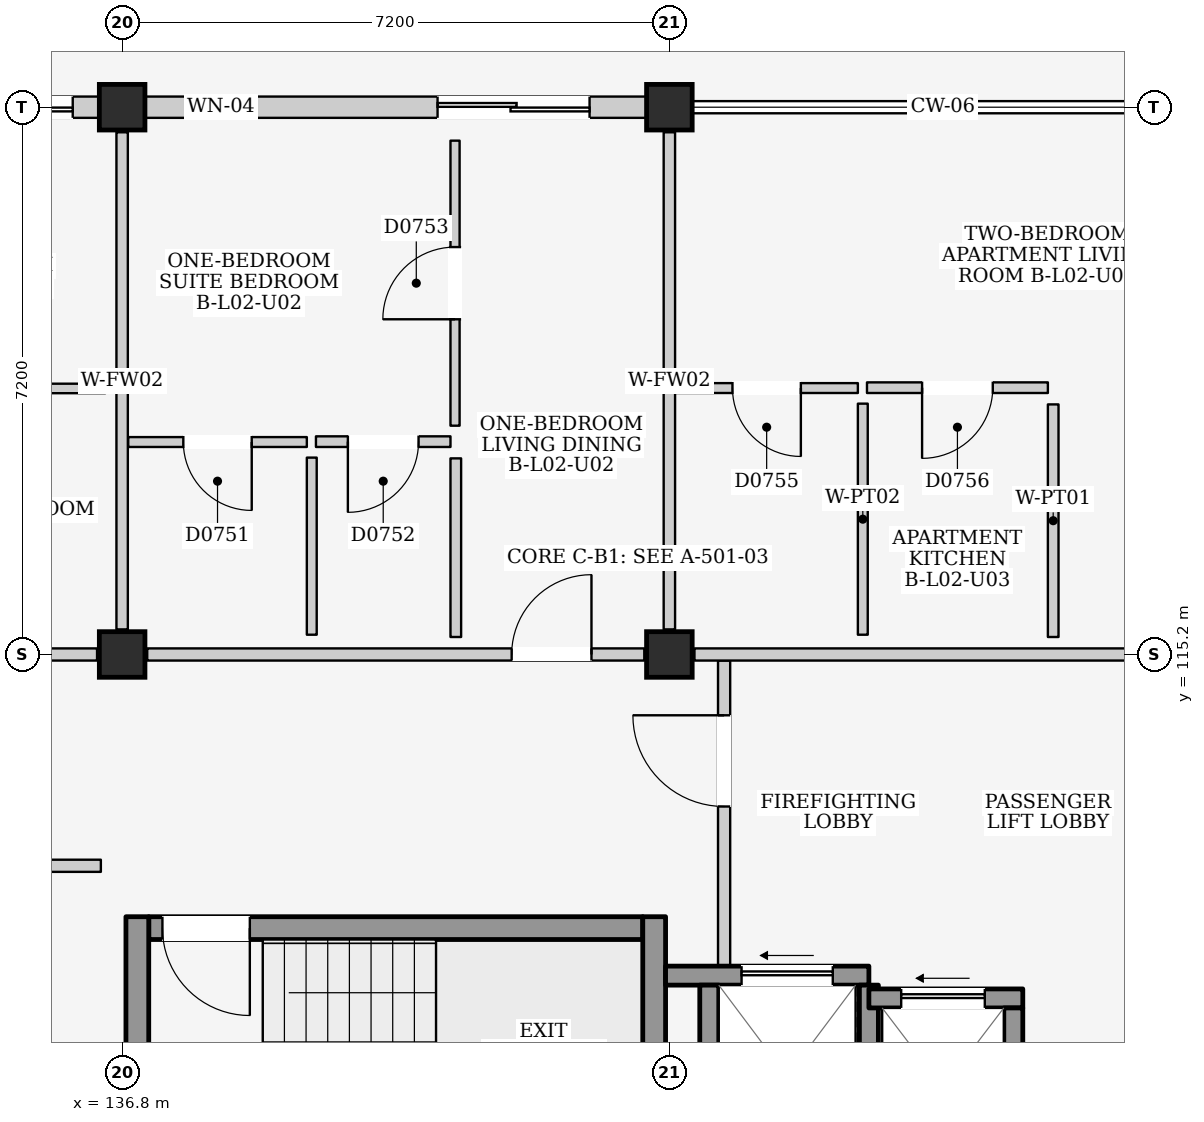
"""IFC4 building model, lengths in metres.
Left out: names, types, materials, properties, quantities, classifications, styles, units other than length and angle.
Written with IfcOpenShell. Run it as: python <this file> out.ifc"""

import sys

from ifc_helpers import new_model, si_unit, direction, frame, frame_2d, origin, origin_2d, place, context, subcontext, project, spatial, rectangle, extrude, element, fill, save


model = new_model("IFC4")
c1 = context("Model", 3, precision=1e-05, world=origin(), true_north=direction((0.0, 1.0)))
c2 = subcontext(c1, "Body", "Model", "MODEL_VIEW")
j1 = project(units=[si_unit("LENGTHUNIT", "METRE"), si_unit("PLANEANGLEUNIT", "RADIAN")], contexts=[c1])
p1 = place(None, origin())
s1 = spatial("IfcSite", under=j1, at=p1, CompositionType="ELEMENT")
p2 = place(p1, origin())
s2 = spatial("IfcBuilding", under=s1, at=p2, CompositionType="ELEMENT")
p3 = place(p2, frame((0.0, 0.0, 9.0)))
s3 = spatial("IfcBuildingStorey", under=s2, at=p3, CompositionType="ELEMENT", Elevation=9.0)
for number, where, z_axis, x_axis in (
    (1, (136.8, 115.2, 0.0), (0.0, 0.0, 1.0), (1.0, 0.0, 0.0)),
    (2, (136.8, 122.4, 0.0), (0.0, 0.0, 1.0), (1.0, 0.0, 0.0)),
    (3, (144.0, 115.2, 0.0), (0.0, 0.0, 1.0), (1.0, 0.0, 0.0)),
    (4, (144.0, 122.4, 0.0), (0.0, 0.0, 1.0), (1.0, 0.0, 0.0)),
):
    element("IfcColumn", number, at=place(p3, frame(where, z_axis=z_axis, x_axis=x_axis)), inside=s3, PredefinedType="COLUMN", context=c2, shape_type="SweptSolid", body=[
        extrude(rectangle(XDim=0.6, YDim=0.6, at=origin_2d()), origin(), (0.0, 0.0, 1.0), 3.2),
    ])
p4 = place(p3, frame((129.9, 122.4, 0.0), z_axis=(0.0, 0.0, 1.0), x_axis=(1.0, 0.0, 0.0)))
e5 = element("IfcWall", 5, at=p4, inside=s3, PredefinedType="ELEMENTEDWALL", context=c2, shape_type="SweptSolid", body=[
    extrude(rectangle(XDim=6.6, YDim=0.28, at=frame_2d((3.3, 0.0))), origin(), (0.0, 0.0, 1.0), 2.425),
])
p5 = place(p4, frame((3.85, 0.0, 0.0)))
e6 = element("IfcOpeningElement", 6, at=p5, cuts=e5, PredefinedType="OPENING", context=c2, shape_type="SweptSolid", body=[
    extrude(rectangle(XDim=2.4, YDim=2.12, at=frame_2d((1.2, 1.06))), frame((0.0, 0.155, 0.0), z_axis=(0.0, -1.0, 0.0), x_axis=(1.0, 0.0, 0.0)), (0.0, 0.0, 1.0), 0.31),
])
p6 = place(p4, frame((0.55, 0.0, 0.9)))
e7 = element("IfcOpeningElement", 7, at=p6, cuts=e5, PredefinedType="OPENING", context=c2, shape_type="SweptSolid", body=[
    extrude(rectangle(XDim=1.2, YDim=1.35, at=frame_2d((0.6, 0.675))), frame((0.0, 0.155, 0.0), z_axis=(0.0, -1.0, 0.0), x_axis=(1.0, 0.0, 0.0)), (0.0, 0.0, 1.0), 0.31),
])
p7 = place(p3, frame((137.1, 122.4, 0.0), z_axis=(0.0, 0.0, 1.0), x_axis=(1.0, 0.0, 0.0)))
e8 = element("IfcWall", 8, at=p7, inside=s3, PredefinedType="ELEMENTEDWALL", context=c2, shape_type="SweptSolid", body=[
    extrude(rectangle(XDim=6.6, YDim=0.28, at=frame_2d((3.3, 0.0))), origin(), (0.0, 0.0, 1.0), 2.425),
])
p8 = place(p7, frame((3.85, 0.0, 0.0)))
e9 = element("IfcOpeningElement", 9, at=p8, cuts=e8, PredefinedType="OPENING", context=c2, shape_type="SweptSolid", body=[
    extrude(rectangle(XDim=2.0, YDim=2.12, at=frame_2d((1.0, 1.06))), frame((0.0, 0.155, 0.0), z_axis=(0.0, -1.0, 0.0), x_axis=(1.0, 0.0, 0.0)), (0.0, 0.0, 1.0), 0.31),
])
p9 = place(p7, frame((0.55, 0.0, 0.9)))
e10 = element("IfcOpeningElement", 10, at=p9, cuts=e8, PredefinedType="OPENING", context=c2, shape_type="SweptSolid", body=[
    extrude(rectangle(XDim=0.9, YDim=1.1, at=frame_2d((0.45, 0.55))), frame((0.0, 0.155, 0.0), z_axis=(0.0, -1.0, 0.0), x_axis=(1.0, 0.0, 0.0)), (0.0, 0.0, 1.0), 0.31),
])
p10 = place(p3, frame((137.15, 111.6, 0.0), z_axis=(0.0, 0.0, 1.0), x_axis=(1.0, 0.0, 0.0)))
e11 = element("IfcWall", 11, at=p10, inside=s3, PredefinedType="SHEAR", context=c2, shape_type="SweptSolid", body=[
    extrude(rectangle(XDim=6.5, YDim=0.3, at=frame_2d((3.25, 0.0))), origin(), (0.0, 0.0, 1.0), 2.96),
])
p11 = place(p10, frame((0.18, 0.0, 0.0)))
e12 = element("IfcOpeningElement", 12, at=p11, cuts=e11, PredefinedType="OPENING", context=c2, shape_type="SweptSolid", body=[
    extrude(rectangle(XDim=1.15, YDim=2.2, at=frame_2d((0.575, 1.1))), frame((0.0, 0.165, 0.0), z_axis=(0.0, -1.0, 0.0), x_axis=(1.0, 0.0, 0.0)), (0.0, 0.0, 1.0), 0.33),
])
for number, where, z_axis, x_axis in (
    (13, (137.0, 108.15, 0.0), (0.0, 0.0, 1.0), (0.0, 1.0, 0.0)),
    (14, (143.8, 108.15, 0.0), (0.0, 0.0, 1.0), (0.0, 1.0, 0.0)),
):
    element("IfcWall", number, at=place(p3, frame(where, z_axis=z_axis, x_axis=x_axis)), inside=s3, PredefinedType="SHEAR", context=c2, shape_type="SweptSolid", body=[
        extrude(rectangle(XDim=3.6, YDim=0.3, at=frame_2d((1.8, 0.0))), origin(), (0.0, 0.0, 1.0), 2.96),
    ])
p12 = place(p3, frame((144.72, 111.1, 0.0), z_axis=(0.0, 0.0, 1.0), x_axis=(0.0, 1.0, 0.0)))
e15 = element("IfcWall", 15, at=p12, inside=s3, PredefinedType="PARTITIONING", context=c2, shape_type="SweptSolid", body=[
    extrude(rectangle(XDim=4.02, YDim=0.16, at=frame_2d((2.01, 0.0))), origin(), (0.0, 0.0, 1.0), 2.96),
])
p13 = place(p12, frame((2.1, 0.0, 0.0)))
e16 = element("IfcOpeningElement", 16, at=p13, cuts=e15, PredefinedType="OPENING", context=c2, shape_type="SweptSolid", body=[
    extrude(rectangle(XDim=1.2, YDim=2.2, at=frame_2d((0.6, 1.1))), frame((0.0, 0.095, 0.0), z_axis=(0.0, -1.0, 0.0), x_axis=(1.0, 0.0, 0.0)), (0.0, 0.0, 1.0), 0.19),
])
p14 = place(p3, frame((143.95, 110.975, 0.0), z_axis=(0.0, 0.0, 1.0), x_axis=(1.0, 0.0, 0.0)))
e17 = element("IfcWall", 17, at=p14, inside=s3, PredefinedType="SHEAR", context=c2, shape_type="SweptSolid", body=[
    extrude(rectangle(XDim=2.675, YDim=0.25, at=frame_2d((1.337, 0.0))), origin(), (0.0, 0.0, 1.0), 2.96),
])
p15 = place(p14, frame((1.0, 0.0, 0.0)))
e18 = element("IfcOpeningElement", 18, at=p15, cuts=e17, PredefinedType="OPENING", context=c2, shape_type="SweptSolid", body=[
    extrude(rectangle(XDim=1.2, YDim=2.25, at=frame_2d((0.6, 1.125))), frame((0.0, 0.14, 0.0), z_axis=(0.0, -1.0, 0.0), x_axis=(1.0, 0.0, 0.0)), (0.0, 0.0, 1.0), 0.28),
])
for number, where, z_axis, x_axis in (
    (19, (144.525, 108.45, 0.0), (0.0, 0.0, 1.0), (0.0, 1.0, 0.0)),
    (20, (146.625, 108.45, 0.0), (0.0, 0.0, 1.0), (0.0, 1.0, 0.0)),
):
    element("IfcWall", number, at=place(p3, frame(where, z_axis=z_axis, x_axis=x_axis)), inside=s3, PredefinedType="SHEAR", context=c2, shape_type="SweptSolid", body=[
        extrude(rectangle(XDim=2.4, YDim=0.25, at=frame_2d((1.2, 0.0))), origin(), (0.0, 0.0, 1.0), 2.96),
    ])
p16 = place(p3, frame((146.625, 110.675, 0.0), z_axis=(0.0, 0.0, 1.0), x_axis=(1.0, 0.0, 0.0)))
e21 = element("IfcWall", 21, at=p16, inside=s3, PredefinedType="SHEAR", context=c2, shape_type="SweptSolid", body=[
    extrude(rectangle(XDim=2.025, YDim=0.25, at=frame_2d((1.012, 0.0))), origin(), (0.0, 0.0, 1.0), 2.96),
])
p17 = place(p16, frame((0.425, 0.0, 0.0)))
e22 = element("IfcOpeningElement", 22, at=p17, cuts=e21, PredefinedType="OPENING", context=c2, shape_type="SweptSolid", body=[
    extrude(rectangle(XDim=1.1, YDim=2.15, at=frame_2d((0.55, 1.075))), frame((0.0, 0.14, 0.0), z_axis=(0.0, -1.0, 0.0), x_axis=(1.0, 0.0, 0.0)), (0.0, 0.0, 1.0), 0.28),
])
p18 = place(p3, frame((148.525, 108.45, 0.0), z_axis=(0.0, 0.0, 1.0), x_axis=(0.0, 1.0, 0.0)))
e23 = element("IfcWall", 23, at=p18, inside=s3, PredefinedType="SHEAR", context=c2, shape_type="SweptSolid", body=[
    extrude(rectangle(XDim=2.1, YDim=0.25, at=frame_2d((1.05, 0.0))), origin(), (0.0, 0.0, 1.0), 2.96),
])
p19 = place(p3, frame((129.93, 115.2, 0.0), z_axis=(0.0, 0.0, 1.0), x_axis=(1.0, 0.0, 0.0)))
e24 = element("IfcWall", 24, at=p19, inside=s3, PredefinedType="PARTITIONING", context=c2, shape_type="SweptSolid", body=[
    extrude(rectangle(XDim=6.54, YDim=0.16, at=frame_2d((3.27, 0.0))), origin(), (0.0, 0.0, 1.0), 2.345),
])
p20 = place(p3, frame((136.8, 115.53, 0.0), z_axis=(0.0, 0.0, 1.0), x_axis=(0.0, 1.0, 0.0)))
e25 = element("IfcWall", 25, at=p20, inside=s3, PredefinedType="PARTITIONING", context=c2, shape_type="SweptSolid", body=[
    extrude(rectangle(XDim=6.54, YDim=0.15, at=frame_2d((3.27, 0.0))), origin(), (0.0, 0.0, 1.0), 2.395),
])
p21 = place(p3, frame((132.52, 118.7, 0.0), z_axis=(0.0, 0.0, 1.0), x_axis=(1.0, 0.0, 0.0)))
e26 = element("IfcWall", 26, at=p21, inside=s3, PredefinedType="PARTITIONING", context=c2, shape_type="SweptSolid", body=[
    extrude(rectangle(XDim=4.06, YDim=0.125, at=frame_2d((2.03, 0.0))), origin(), (0.0, 0.0, 1.0), 2.96),
])
p22 = place(p3, frame((137.13, 115.2, 0.0), z_axis=(0.0, 0.0, 1.0), x_axis=(1.0, 0.0, 0.0)))
e27 = element("IfcWall", 27, at=p22, inside=s3, PredefinedType="PARTITIONING", context=c2, shape_type="SweptSolid", body=[
    extrude(rectangle(XDim=6.54, YDim=0.16, at=frame_2d((3.27, 0.0))), origin(), (0.0, 0.0, 1.0), 2.345),
])
p23 = place(p22, frame((4.795, 0.0, 0.0)))
e28 = element("IfcOpeningElement", 28, at=p23, cuts=e27, PredefinedType="OPENING", context=c2, shape_type="SweptSolid", body=[
    extrude(rectangle(XDim=1.05, YDim=2.15, at=frame_2d((0.525, 1.075))), frame((0.0, 0.095, 0.0), z_axis=(0.0, -1.0, 0.0), x_axis=(1.0, 0.0, 0.0)), (0.0, 0.0, 1.0), 0.19),
])
p24 = place(p3, frame((144.0, 115.53, 0.0), z_axis=(0.0, 0.0, 1.0), x_axis=(0.0, 1.0, 0.0)))
e29 = element("IfcWall", 29, at=p24, inside=s3, PredefinedType="PARTITIONING", context=c2, shape_type="SweptSolid", body=[
    extrude(rectangle(XDim=6.54, YDim=0.15, at=frame_2d((3.27, 0.0))), origin(), (0.0, 0.0, 1.0), 2.395),
])
p25 = place(p3, frame((136.88, 117.995, 0.0), z_axis=(0.0, 0.0, 1.0), x_axis=(1.0, 0.0, 0.0)))
e30 = element("IfcWall", 30, at=p25, inside=s3, PredefinedType="PARTITIONING", context=c2, shape_type="SweptSolid", body=[
    extrude(rectangle(XDim=2.35, YDim=0.13, at=frame_2d((1.175, 0.0))), origin(), (0.0, 0.0, 1.0), 2.96),
])
p26 = place(p25, frame((0.725, 0.0, 0.0)))
e31 = element("IfcOpeningElement", 31, at=p26, cuts=e30, PredefinedType="OPENING", context=c2, shape_type="SweptSolid", body=[
    extrude(rectangle(XDim=0.9, YDim=2.1, at=frame_2d((0.45, 1.05))), frame((0.0, 0.08, 0.0), z_axis=(0.0, -1.0, 0.0), x_axis=(1.0, 0.0, 0.0)), (0.0, 0.0, 1.0), 0.16),
])
p27 = place(p3, frame((139.295, 115.46, 0.0), z_axis=(0.0, 0.0, 1.0), x_axis=(0.0, 1.0, 0.0)))
e32 = element("IfcWall", 32, at=p27, inside=s3, PredefinedType="PARTITIONING", context=c2, shape_type="SweptSolid", body=[
    extrude(rectangle(XDim=2.33, YDim=0.13, at=frame_2d((1.165, 0.0))), origin(), (0.0, 0.0, 1.0), 2.96),
])
p28 = place(p3, frame((139.35, 118.0, 0.0), z_axis=(0.0, 0.0, 1.0), x_axis=(1.0, 0.0, 0.0)))
e33 = element("IfcWall", 33, at=p28, inside=s3, PredefinedType="PARTITIONING", context=c2, shape_type="SweptSolid", body=[
    extrude(rectangle(XDim=1.77, YDim=0.14, at=frame_2d((0.885, 0.0))), origin(), (0.0, 0.0, 1.0), 2.96),
])
p29 = place(p28, frame((0.42, 0.0, 0.0)))
e34 = element("IfcOpeningElement", 34, at=p29, cuts=e33, PredefinedType="OPENING", context=c2, shape_type="SweptSolid", body=[
    extrude(rectangle(XDim=0.93, YDim=2.14, at=frame_2d((0.465, 1.07))), frame((0.0, 0.085, 0.0), z_axis=(0.0, -1.0, 0.0), x_axis=(1.0, 0.0, 0.0)), (0.0, 0.0, 1.0), 0.17),
])
p30 = place(p3, frame((141.19, 115.43, 0.0), z_axis=(0.0, 0.0, 1.0), x_axis=(0.0, 1.0, 0.0)))
e35 = element("IfcWall", 35, at=p30, inside=s3, PredefinedType="PARTITIONING", context=c2, shape_type="SweptSolid", body=[
    extrude(rectangle(XDim=2.35, YDim=0.14, at=frame_2d((1.175, 0.0))), origin(), (0.0, 0.0, 1.0), 2.96),
])
p31 = place(p3, frame((141.18, 118.21, 0.0), z_axis=(0.0, 0.0, 1.0), x_axis=(0.0, 1.0, 0.0)))
e36 = element("IfcWall", 36, at=p31, inside=s3, PredefinedType="PARTITIONING", context=c2, shape_type="SweptSolid", body=[
    extrude(rectangle(XDim=3.75, YDim=0.12, at=frame_2d((1.875, 0.0))), origin(), (0.0, 0.0, 1.0), 2.96),
])
p32 = place(p31, frame((1.4, 0.0, 0.0)))
e37 = element("IfcOpeningElement", 37, at=p32, cuts=e36, PredefinedType="OPENING", context=c2, shape_type="SweptSolid", body=[
    extrude(rectangle(XDim=0.95, YDim=2.15, at=frame_2d((0.475, 1.075))), frame((0.0, 0.075, 0.0), z_axis=(0.0, -1.0, 0.0), x_axis=(1.0, 0.0, 0.0)), (0.0, 0.0, 1.0), 0.15),
])
p33 = place(p3, frame((144.33, 115.2, 0.0), z_axis=(0.0, 0.0, 1.0), x_axis=(1.0, 0.0, 0.0)))
e38 = element("IfcWall", 38, at=p33, inside=s3, PredefinedType="PARTITIONING", context=c2, shape_type="SweptSolid", body=[
    extrude(rectangle(XDim=6.54, YDim=0.16, at=frame_2d((3.27, 0.0))), origin(), (0.0, 0.0, 1.0), 2.345),
])
p34 = place(p3, frame((144.08, 118.705, 0.0), z_axis=(0.0, 0.0, 1.0), x_axis=(1.0, 0.0, 0.0)))
e39 = element("IfcWall", 39, at=p34, inside=s3, PredefinedType="PARTITIONING", context=c2, shape_type="SweptSolid", body=[
    extrude(rectangle(XDim=2.4, YDim=0.13, at=frame_2d((1.2, 0.0))), origin(), (0.0, 0.0, 1.0), 2.96),
])
p35 = place(p34, frame((0.75, 0.0, 0.0)))
e40 = element("IfcOpeningElement", 40, at=p35, cuts=e39, PredefinedType="OPENING", context=c2, shape_type="SweptSolid", body=[
    extrude(rectangle(XDim=0.9, YDim=2.1, at=frame_2d((0.45, 1.05))), frame((0.0, 0.08, 0.0), z_axis=(0.0, -1.0, 0.0), x_axis=(1.0, 0.0, 0.0)), (0.0, 0.0, 1.0), 0.16),
])
p36 = place(p3, frame((146.545, 115.46, 0.0), z_axis=(0.0, 0.0, 1.0), x_axis=(0.0, 1.0, 0.0)))
e41 = element("IfcWall", 41, at=p36, inside=s3, PredefinedType="PARTITIONING", context=c2, shape_type="SweptSolid", body=[
    extrude(rectangle(XDim=3.04, YDim=0.13, at=frame_2d((1.52, 0.0))), origin(), (0.0, 0.0, 1.0), 2.96),
])
p37 = place(p3, frame((146.6, 118.71, 0.0), z_axis=(0.0, 0.0, 1.0), x_axis=(1.0, 0.0, 0.0)))
e42 = element("IfcWall", 42, at=p37, inside=s3, PredefinedType="PARTITIONING", context=c2, shape_type="SweptSolid", body=[
    extrude(rectangle(XDim=2.38, YDim=0.14, at=frame_2d((1.19, 0.0))), origin(), (0.0, 0.0, 1.0), 2.96),
])
p38 = place(p37, frame((0.725, 0.0, 0.0)))
e43 = element("IfcOpeningElement", 43, at=p38, cuts=e42, PredefinedType="OPENING", context=c2, shape_type="SweptSolid", body=[
    extrude(rectangle(XDim=0.93, YDim=2.14, at=frame_2d((0.465, 1.07))), frame((0.0, 0.085, 0.0), z_axis=(0.0, -1.0, 0.0), x_axis=(1.0, 0.0, 0.0)), (0.0, 0.0, 1.0), 0.17),
])
p39 = place(p3, frame((149.05, 115.43, 0.0), z_axis=(0.0, 0.0, 1.0), x_axis=(0.0, 1.0, 0.0)))
e44 = element("IfcWall", 44, at=p39, inside=s3, PredefinedType="PARTITIONING", context=c2, shape_type="SweptSolid", body=[
    extrude(rectangle(XDim=3.06, YDim=0.14, at=frame_2d((1.53, 0.0))), origin(), (0.0, 0.0, 1.0), 2.96),
])
p40 = place(p3, frame((129.88, 112.42, 0.0), z_axis=(0.0, 0.0, 1.0), x_axis=(1.0, 0.0, 0.0)))
e45 = element("IfcWall", 45, at=p40, inside=s3, PredefinedType="PARTITIONING", context=c2, shape_type="SweptSolid", body=[
    extrude(rectangle(XDim=6.64, YDim=0.16, at=frame_2d((3.32, 0.0))), origin(), (0.0, 0.0, 1.0), 2.96),
])
p41 = place(p40, frame((2.78, 0.0, 0.0)))
e46 = element("IfcOpeningElement", 46, at=p41, cuts=e45, PredefinedType="OPENING", context=c2, shape_type="SweptSolid", body=[
    extrude(rectangle(XDim=1.08, YDim=2.22, at=frame_2d((0.54, 1.11))), frame((0.0, 0.095, 0.0), z_axis=(0.0, -1.0, 0.0), x_axis=(1.0, 0.0, 0.0)), (0.0, 0.0, 1.0), 0.19),
])
p42 = place(p5, frame((2.4, 0.0, 0.0), z_axis=(0.0, 0.0, 1.0), x_axis=(-1.0, 0.0, 0.0)))
e47 = element("IfcDoor", 47, at=p42, inside=s3, OperationType="DOUBLE_DOOR_SLIDING", PredefinedType="DOOR", context=c2, shape_type="SweptSolid", body=[
    extrude(rectangle(XDim=2.4, YDim=2.12, at=frame_2d((1.2, 1.06))), frame((0.0, 0.025, 0.0), z_axis=(0.0, -1.0, 0.0), x_axis=(1.0, 0.0, 0.0)), (0.0, 0.0, 1.0), 0.05),
])
fill(e6, e47)
p43 = place(p8, frame((2.0, 0.0, 0.0), z_axis=(0.0, 0.0, 1.0), x_axis=(-1.0, 0.0, 0.0)))
e48 = element("IfcDoor", 48, at=p43, inside=s3, OperationType="DOUBLE_DOOR_SLIDING", PredefinedType="DOOR", context=c2, shape_type="SweptSolid", body=[
    extrude(rectangle(XDim=2.0, YDim=2.12, at=frame_2d((1.0, 1.06))), frame((0.0, 0.025, 0.0), z_axis=(0.0, -1.0, 0.0), x_axis=(1.0, 0.0, 0.0)), (0.0, 0.0, 1.0), 0.05),
])
fill(e9, e48)
p44 = place(p9, origin())
e49 = element("IfcWindow", 49, at=p44, inside=s3, PartitioningType="SINGLE_PANEL", PredefinedType="WINDOW", context=c2, shape_type="SweptSolid", body=[
    extrude(rectangle(XDim=0.9, YDim=1.1, at=frame_2d((0.45, 0.55))), frame((0.0, 0.03, 0.0), z_axis=(0.0, -1.0, 0.0), x_axis=(1.0, 0.0, 0.0)), (0.0, 0.0, 1.0), 0.06),
])
fill(e10, e49)
p45 = place(p11, frame((1.15, 0.0, 0.0), z_axis=(0.0, 0.0, 1.0), x_axis=(-1.0, 0.0, 0.0)))
e50 = element("IfcDoor", 50, at=p45, inside=s3, OperationType="SINGLE_SWING_LEFT", PredefinedType="DOOR", context=c2, shape_type="SweptSolid", body=[
    extrude(rectangle(XDim=1.15, YDim=2.2, at=frame_2d((0.575, 1.1))), frame((0.0, 0.025, 0.0), z_axis=(0.0, -1.0, 0.0), x_axis=(1.0, 0.0, 0.0)), (0.0, 0.0, 1.0), 0.05),
])
fill(e12, e50)
p46 = place(p13, origin())
e51 = element("IfcDoor", 51, at=p46, inside=s3, OperationType="SINGLE_SWING_RIGHT", PredefinedType="DOOR", context=c2, shape_type="SweptSolid", body=[
    extrude(rectangle(XDim=1.2, YDim=2.2, at=frame_2d((0.6, 1.1))), frame((0.0, 0.025, 0.0), z_axis=(0.0, -1.0, 0.0), x_axis=(1.0, 0.0, 0.0)), (0.0, 0.0, 1.0), 0.05),
])
fill(e16, e51)
p47 = place(p15, origin())
e52 = element("IfcDoor", 52, at=p47, inside=s3, OperationType="SLIDING_TO_LEFT", PredefinedType="DOOR", context=c2, shape_type="SweptSolid", body=[
    extrude(rectangle(XDim=1.2, YDim=2.25, at=frame_2d((0.6, 1.125))), frame((0.0, 0.025, 0.0), z_axis=(0.0, -1.0, 0.0), x_axis=(1.0, 0.0, 0.0)), (0.0, 0.0, 1.0), 0.05),
])
fill(e18, e52)
p48 = place(p17, origin())
e53 = element("IfcDoor", 53, at=p48, inside=s3, OperationType="SLIDING_TO_LEFT", PredefinedType="DOOR", context=c2, shape_type="SweptSolid", body=[
    extrude(rectangle(XDim=1.1, YDim=2.15, at=frame_2d((0.55, 1.075))), frame((0.0, 0.025, 0.0), z_axis=(0.0, -1.0, 0.0), x_axis=(1.0, 0.0, 0.0)), (0.0, 0.0, 1.0), 0.05),
])
fill(e22, e53)
p49 = place(p23, origin())
e54 = element("IfcDoor", 54, at=p49, inside=s3, OperationType="SINGLE_SWING_RIGHT", PredefinedType="DOOR", context=c2, shape_type="SweptSolid", body=[
    extrude(rectangle(XDim=1.05, YDim=2.15, at=frame_2d((0.525, 1.075))), frame((0.0, 0.025, 0.0), z_axis=(0.0, -1.0, 0.0), x_axis=(1.0, 0.0, 0.0)), (0.0, 0.0, 1.0), 0.05),
])
fill(e28, e54)
p50 = place(p26, frame((0.9, 0.0, 0.0), z_axis=(0.0, 0.0, 1.0), x_axis=(-1.0, 0.0, 0.0)))
e55 = element("IfcDoor", 55, at=p50, inside=s3, OperationType="SINGLE_SWING_LEFT", PredefinedType="DOOR", context=c2, shape_type="SweptSolid", body=[
    extrude(rectangle(XDim=0.9, YDim=2.1, at=frame_2d((0.45, 1.05))), frame((0.0, 0.025, 0.0), z_axis=(0.0, -1.0, 0.0), x_axis=(1.0, 0.0, 0.0)), (0.0, 0.0, 1.0), 0.05),
])
fill(e31, e55)
p51 = place(p29, frame((0.93, 0.0, 0.0), z_axis=(0.0, 0.0, 1.0), x_axis=(-1.0, 0.0, 0.0)))
e56 = element("IfcDoor", 56, at=p51, inside=s3, OperationType="SINGLE_SWING_RIGHT", PredefinedType="DOOR", context=c2, shape_type="SweptSolid", body=[
    extrude(rectangle(XDim=0.93, YDim=2.14, at=frame_2d((0.465, 1.07))), frame((0.0, 0.025, 0.0), z_axis=(0.0, -1.0, 0.0), x_axis=(1.0, 0.0, 0.0)), (0.0, 0.0, 1.0), 0.05),
])
fill(e34, e56)
p52 = place(p32, origin())
e57 = element("IfcDoor", 57, at=p52, inside=s3, OperationType="SINGLE_SWING_LEFT", PredefinedType="DOOR", context=c2, shape_type="SweptSolid", body=[
    extrude(rectangle(XDim=0.95, YDim=2.15, at=frame_2d((0.475, 1.075))), frame((0.0, 0.025, 0.0), z_axis=(0.0, -1.0, 0.0), x_axis=(1.0, 0.0, 0.0)), (0.0, 0.0, 1.0), 0.05),
])
fill(e37, e57)
p53 = place(p35, frame((0.9, 0.0, 0.0), z_axis=(0.0, 0.0, 1.0), x_axis=(-1.0, 0.0, 0.0)))
e58 = element("IfcDoor", 58, at=p53, inside=s3, OperationType="SINGLE_SWING_LEFT", PredefinedType="DOOR", context=c2, shape_type="SweptSolid", body=[
    extrude(rectangle(XDim=0.9, YDim=2.1, at=frame_2d((0.45, 1.05))), frame((0.0, 0.025, 0.0), z_axis=(0.0, -1.0, 0.0), x_axis=(1.0, 0.0, 0.0)), (0.0, 0.0, 1.0), 0.05),
])
fill(e40, e58)
p54 = place(p38, frame((0.93, 0.0, 0.0), z_axis=(0.0, 0.0, 1.0), x_axis=(-1.0, 0.0, 0.0)))
e59 = element("IfcDoor", 59, at=p54, inside=s3, OperationType="SINGLE_SWING_RIGHT", PredefinedType="DOOR", context=c2, shape_type="SweptSolid", body=[
    extrude(rectangle(XDim=0.93, YDim=2.14, at=frame_2d((0.465, 1.07))), frame((0.0, 0.025, 0.0), z_axis=(0.0, -1.0, 0.0), x_axis=(1.0, 0.0, 0.0)), (0.0, 0.0, 1.0), 0.05),
])
fill(e43, e59)
save(model, sys.argv[1])
